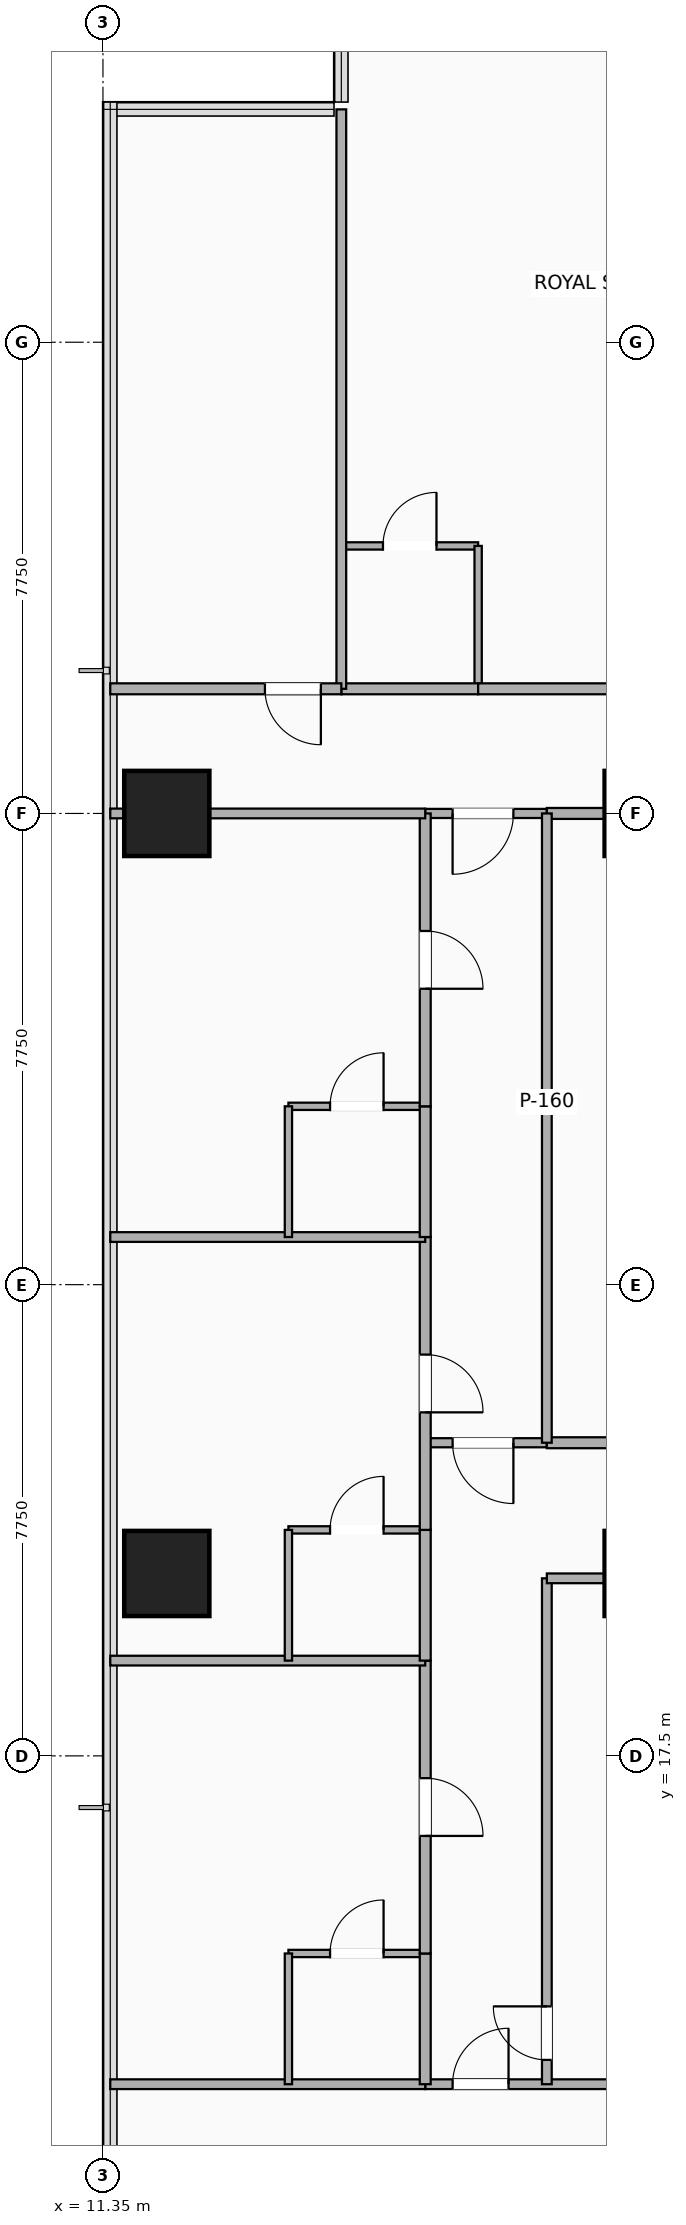
"""IFC4 building model, lengths in metres.
Left out: names, types, materials, properties, quantities, classifications, styles, units other than length and angle.
Written with IfcOpenShell. Run it as: python <this file> out.ifc"""

import sys

from ifc_helpers import new_model, si_unit, direction, frame, frame_2d, origin, origin_2d, place, context, subcontext, project, spatial, rectangle, extrude, element, fill, save


model = new_model("IFC4")
c1 = context("Model", 3, precision=1e-05, world=origin(), true_north=direction((0.0, 1.0)))
c2 = subcontext(c1, "Body", "Model", "MODEL_VIEW")
j1 = project(units=[si_unit("LENGTHUNIT", "METRE"), si_unit("PLANEANGLEUNIT", "RADIAN")], contexts=[c1])
p1 = place(None, origin())
s1 = spatial("IfcSite", under=j1, at=p1, CompositionType="ELEMENT")
p2 = place(p1, origin())
s2 = spatial("IfcBuilding", under=s1, at=p2, CompositionType="ELEMENT")
p3 = place(p2, frame((0.0, 0.0, 64.9)))
s3 = spatial("IfcBuildingStorey", under=s2, at=p3, CompositionType="ELEMENT", Elevation=64.9)
for number, where, z_axis, x_axis in (
    (1, (20.3, 20.5, -0.28), (0.0, 0.0, 1.0), (1.0, 0.0, 0.0)),
    (2, (20.3, 33.0, -0.28), (0.0, 0.0, 1.0), (1.0, 0.0, 0.0)),
    (3, (12.4, 20.5, -0.28), (0.0, 0.0, 1.0), (1.0, 0.0, 0.0)),
    (4, (12.4, 33.0, -0.28), (0.0, 0.0, 1.0), (1.0, 0.0, 0.0)),
):
    element("IfcColumn", number, at=place(p3, frame(where, z_axis=z_axis, x_axis=x_axis)), inside=s3, PredefinedType="COLUMN", context=c2, shape_type="SweptSolid", body=[
        extrude(rectangle(XDim=1.4, YDim=1.4, at=origin_2d()), origin(), (0.0, 0.0, 1.0), 3.5),
    ])
p4 = place(p3, frame((16.65, 12.1, 0.0), z_axis=(0.0, 0.0, 1.0), x_axis=(1.0, 0.0, 0.0)))
e5 = element("IfcWall", 5, at=p4, inside=s3, PredefinedType="PARTITIONING", context=c2, shape_type="SweptSolid", body=[
    extrude(rectangle(XDim=3.65, YDim=0.16, at=frame_2d((1.825, 0.0))), origin(), (0.0, 0.0, 1.0), 2.51),
])
p5 = place(p4, frame((1.37, 0.0, 0.0), z_axis=(0.0, 0.0, 1.0), x_axis=(-1.0, 0.0, 0.0)))
e6 = element("IfcOpeningElement", 6, at=p5, cuts=e5, PredefinedType="OPENING", context=c2, shape_type="SweptSolid", body=[
    extrude(rectangle(XDim=0.92, YDim=2.08, at=frame_2d((0.46, 1.04))), frame((0.0, 0.09, 0.0), z_axis=(0.0, -1.0, 0.0), x_axis=(1.0, 0.0, 0.0)), (0.0, 0.0, 1.0), 0.18),
])
p6 = place(p3, frame((18.65, 12.1, 0.0), z_axis=(0.0, 0.0, 1.0), x_axis=(0.0, 1.0, 0.0)))
e7 = element("IfcWall", 7, at=p6, inside=s3, PredefinedType="PARTITIONING", context=c2, shape_type="SweptSolid", body=[
    extrude(rectangle(XDim=8.32, YDim=0.16, at=frame_2d((4.16, 0.0))), origin(), (0.0, 0.0, 1.0), 2.51),
])
p7 = place(p6, frame((1.28, 0.0, 0.0), z_axis=(0.0, 0.0, 1.0), x_axis=(-1.0, 0.0, 0.0)))
e8 = element("IfcOpeningElement", 8, at=p7, cuts=e7, PredefinedType="OPENING", context=c2, shape_type="SweptSolid", body=[
    extrude(rectangle(XDim=0.88, YDim=2.08, at=frame_2d((0.44, 1.04))), frame((0.0, 0.09, 0.0), z_axis=(0.0, -1.0, 0.0), x_axis=(1.0, 0.0, 0.0)), (0.0, 0.0, 1.0), 0.18),
])
p8 = place(p3, frame((18.65, 20.42, 0.0), z_axis=(0.0, 0.0, 1.0), x_axis=(1.0, 0.0, 0.0)))
e9 = element("IfcWall", 9, at=p8, inside=s3, PredefinedType="PARTITIONING", context=c2, shape_type="SweptSolid", body=[
    extrude(rectangle(XDim=1.65, YDim=0.16, at=frame_2d((0.825, 0.0))), origin(), (0.0, 0.0, 1.0), 2.51),
])
p9 = place(p3, frame((16.65, 22.65, 0.0), z_axis=(0.0, 0.0, 1.0), x_axis=(1.0, 0.0, 0.0)))
e10 = element("IfcWall", 10, at=p9, inside=s3, PredefinedType="PARTITIONING", context=c2, shape_type="SweptSolid", body=[
    extrude(rectangle(XDim=2.0, YDim=0.15, at=frame_2d((1.0, 0.0))), origin(), (0.0, 0.0, 1.0), 3.22),
])
p10 = place(p9, frame((0.45, 0.0, 0.0)))
e11 = element("IfcOpeningElement", 11, at=p10, cuts=e10, PredefinedType="OPENING", context=c2, shape_type="SweptSolid", body=[
    extrude(rectangle(XDim=1.0, YDim=2.15, at=frame_2d((0.5, 1.075))), frame((0.0, 0.085, 0.0), z_axis=(0.0, -1.0, 0.0), x_axis=(1.0, 0.0, 0.0)), (0.0, 0.0, 1.0), 0.17),
])
p11 = place(p3, frame((16.65, 33.0, 0.0), z_axis=(0.0, 0.0, 1.0), x_axis=(1.0, 0.0, 0.0)))
e12 = element("IfcWall", 12, at=p11, inside=s3, PredefinedType="PARTITIONING", context=c2, shape_type="SweptSolid", body=[
    extrude(rectangle(XDim=2.0, YDim=0.15, at=frame_2d((1.0, 0.0))), origin(), (0.0, 0.0, 1.0), 2.51),
])
p12 = place(p11, frame((0.45, 0.0, 0.0)))
e13 = element("IfcOpeningElement", 13, at=p12, cuts=e12, PredefinedType="OPENING", context=c2, shape_type="SweptSolid", body=[
    extrude(rectangle(XDim=1.0, YDim=2.15, at=frame_2d((0.5, 1.075))), frame((0.0, 0.085, 0.0), z_axis=(0.0, -1.0, 0.0), x_axis=(1.0, 0.0, 0.0)), (0.0, 0.0, 1.0), 0.17),
])
p13 = place(p3, frame((18.65, 22.65, 0.0), z_axis=(0.0, 0.0, 1.0), x_axis=(1.0, 0.0, 0.0)))
e14 = element("IfcWall", 14, at=p13, inside=s3, PredefinedType="PARTITIONING", context=c2, shape_type="SweptSolid", body=[
    extrude(rectangle(XDim=5.45, YDim=0.18, at=frame_2d((2.725, 0.0))), origin(), (0.0, 0.0, 1.0), 2.51),
])
p14 = place(p13, frame((2.25, 0.0, 0.0)))
e15 = element("IfcOpeningElement", 15, at=p14, cuts=e14, PredefinedType="OPENING", context=c2, shape_type="SweptSolid", body=[
    extrude(rectangle(XDim=0.95, YDim=2.15, at=frame_2d((0.475, 1.075))), frame((0.0, 0.1, 0.0), z_axis=(0.0, -1.0, 0.0), x_axis=(1.0, 0.0, 0.0)), (0.0, 0.0, 1.0), 0.2),
])
p15 = place(p3, frame((18.65, 33.0, 0.0), z_axis=(0.0, 0.0, 1.0), x_axis=(1.0, 0.0, 0.0)))
e16 = element("IfcWall", 16, at=p15, inside=s3, PredefinedType="PARTITIONING", context=c2, shape_type="SweptSolid", body=[
    extrude(rectangle(XDim=5.45, YDim=0.18, at=frame_2d((2.725, 0.0))), origin(), (0.0, 0.0, 1.0), 2.51),
])
p16 = place(p3, frame((18.65, 22.65, 0.0), z_axis=(0.0, 0.0, 1.0), x_axis=(0.0, 1.0, 0.0)))
e17 = element("IfcWall", 17, at=p16, inside=s3, PredefinedType="PARTITIONING", context=c2, shape_type="SweptSolid", body=[
    extrude(rectangle(XDim=10.35, YDim=0.16, at=frame_2d((5.175, 0.0))), origin(), (0.0, 0.0, 1.0), 2.51),
])
p17 = place(p3, frame((15.27, 37.4, 0.0), z_axis=(0.0, 0.0, 1.0), x_axis=(1.0, 0.0, 0.0)))
e18 = element("IfcWall", 18, at=p17, inside=s3, PredefinedType="PARTITIONING", context=c2, shape_type="SweptSolid", body=[
    extrude(rectangle(XDim=2.25, YDim=0.12, at=frame_2d((1.125, 0.0))), origin(), (0.0, 0.0, 1.0), 3.22),
])
p18 = place(p17, frame((1.565, 0.0, 0.0), z_axis=(0.0, 0.0, 1.0), x_axis=(-1.0, 0.0, 0.0)))
e19 = element("IfcOpeningElement", 19, at=p18, cuts=e18, PredefinedType="OPENING", context=c2, shape_type="SweptSolid", body=[
    extrude(rectangle(XDim=0.88, YDim=2.08, at=frame_2d((0.44, 1.04))), frame((0.0, 0.07, 0.0), z_axis=(0.0, -1.0, 0.0), x_axis=(1.0, 0.0, 0.0)), (0.0, 0.0, 1.0), 0.14),
])
p19 = place(p3, frame((17.52, 35.05, 0.0), z_axis=(0.0, 0.0, 1.0), x_axis=(0.0, 1.0, 0.0)))
e20 = element("IfcWall", 20, at=p19, inside=s3, PredefinedType="PARTITIONING", context=c2, shape_type="SweptSolid", body=[
    extrude(rectangle(XDim=2.35, YDim=0.12, at=frame_2d((1.175, 0.0))), origin(), (0.0, 0.0, 1.0), 3.22),
])
p20 = place(p3, frame((15.27, 35.05, 0.0), z_axis=(0.0, 0.0, 1.0), x_axis=(1.0, 0.0, 0.0)))
e21 = element("IfcWall", 21, at=p20, inside=s3, PredefinedType="PARTITIONING", context=c2, shape_type="SweptSolid", body=[
    extrude(rectangle(XDim=2.25, YDim=0.18, at=frame_2d((1.125, 0.0))), origin(), (0.0, 0.0, 1.0), 3.22),
])
p21 = place(p3, frame((17.52, 35.05, 0.0), z_axis=(0.0, 0.0, 1.0), x_axis=(1.0, 0.0, 0.0)))
e22 = element("IfcWall", 22, at=p21, inside=s3, PredefinedType="PARTITIONING", context=c2, shape_type="SweptSolid", body=[
    extrude(rectangle(XDim=6.131, YDim=0.18, at=frame_2d((3.065, 0.0))), origin(), (0.0, 0.0, 1.0), 2.51),
])
p22 = place(p21, frame((2.591, 0.0, 0.0)))
e23 = element("IfcOpeningElement", 23, at=p22, cuts=e22, PredefinedType="OPENING", context=c2, shape_type="SweptSolid", body=[
    extrude(rectangle(XDim=0.95, YDim=2.15, at=frame_2d((0.475, 1.075))), frame((0.0, 0.1, 0.0), z_axis=(0.0, -1.0, 0.0), x_axis=(1.0, 0.0, 0.0)), (0.0, 0.0, 1.0), 0.2),
])
p23 = place(p3, frame((15.27, 35.05, 0.0), z_axis=(0.0, 0.0, 1.0), x_axis=(0.0, 1.0, 0.0)))
e24 = element("IfcWall", 24, at=p23, inside=s3, PredefinedType="PARTITIONING", context=c2, shape_type="SweptSolid", body=[
    extrude(rectangle(XDim=9.53, YDim=0.16, at=frame_2d((4.765, 0.0))), origin(), (0.0, 0.0, 1.0), 3.22),
])
p24 = place(p3, frame((11.47, 12.1, 0.0), z_axis=(0.0, 0.0, 1.0), x_axis=(1.0, 0.0, 0.0)))
e25 = element("IfcWall", 25, at=p24, inside=s3, PredefinedType="PARTITIONING", context=c2, shape_type="SweptSolid", body=[
    extrude(rectangle(XDim=5.18, YDim=0.16, at=frame_2d((2.59, 0.0))), origin(), (0.0, 0.0, 1.0), 2.583),
])
p25 = place(p3, frame((14.4, 14.25, 0.0), z_axis=(0.0, 0.0, 1.0), x_axis=(1.0, 0.0, 0.0)))
e26 = element("IfcWall", 26, at=p25, inside=s3, PredefinedType="PARTITIONING", context=c2, shape_type="SweptSolid", body=[
    extrude(rectangle(XDim=2.25, YDim=0.12, at=frame_2d((1.125, 0.0))), origin(), (0.0, 0.0, 1.0), 3.22),
])
p26 = place(p25, frame((1.565, 0.0, 0.0), z_axis=(0.0, 0.0, 1.0), x_axis=(-1.0, 0.0, 0.0)))
e27 = element("IfcOpeningElement", 27, at=p26, cuts=e26, PredefinedType="OPENING", context=c2, shape_type="SweptSolid", body=[
    extrude(rectangle(XDim=0.88, YDim=2.08, at=frame_2d((0.44, 1.04))), frame((0.0, 0.07, 0.0), z_axis=(0.0, -1.0, 0.0), x_axis=(1.0, 0.0, 0.0)), (0.0, 0.0, 1.0), 0.14),
])
p27 = place(p3, frame((14.4, 12.1, 0.0), z_axis=(0.0, 0.0, 1.0), x_axis=(0.0, 1.0, 0.0)))
e28 = element("IfcWall", 28, at=p27, inside=s3, PredefinedType="PARTITIONING", context=c2, shape_type="SweptSolid", body=[
    extrude(rectangle(XDim=2.15, YDim=0.12, at=frame_2d((1.075, 0.0))), origin(), (0.0, 0.0, 1.0), 2.902),
])
p28 = place(p3, frame((16.65, 12.1, 0.0), z_axis=(0.0, 0.0, 1.0), x_axis=(0.0, 1.0, 0.0)))
e29 = element("IfcWall", 29, at=p28, inside=s3, PredefinedType="PARTITIONING", context=c2, shape_type="SweptSolid", body=[
    extrude(rectangle(XDim=2.15, YDim=0.18, at=frame_2d((1.075, 0.0))), origin(), (0.0, 0.0, 1.0), 2.902),
])
p29 = place(p3, frame((16.65, 14.25, 0.0), z_axis=(0.0, 0.0, 1.0), x_axis=(0.0, 1.0, 0.0)))
e30 = element("IfcWall", 30, at=p29, inside=s3, PredefinedType="PARTITIONING", context=c2, shape_type="SweptSolid", body=[
    extrude(rectangle(XDim=4.817, YDim=0.18, at=frame_2d((2.408, 0.0))), origin(), (0.0, 0.0, 1.0), 2.902),
])
p30 = place(p29, frame((1.933, 0.0, 0.0)))
e31 = element("IfcOpeningElement", 31, at=p30, cuts=e30, PredefinedType="OPENING", context=c2, shape_type="SweptSolid", body=[
    extrude(rectangle(XDim=0.95, YDim=2.15, at=frame_2d((0.475, 1.075))), frame((0.0, 0.1, 0.0), z_axis=(0.0, -1.0, 0.0), x_axis=(1.0, 0.0, 0.0)), (0.0, 0.0, 1.0), 0.2),
])
p31 = place(p3, frame((11.47, 19.067, 0.0), z_axis=(0.0, 0.0, 1.0), x_axis=(1.0, 0.0, 0.0)))
e32 = element("IfcWall", 32, at=p31, inside=s3, PredefinedType="PARTITIONING", context=c2, shape_type="SweptSolid", body=[
    extrude(rectangle(XDim=5.18, YDim=0.16, at=frame_2d((2.59, 0.0))), origin(), (0.0, 0.0, 1.0), 2.583),
])
p32 = place(p3, frame((14.4, 21.217, 0.0), z_axis=(0.0, 0.0, 1.0), x_axis=(1.0, 0.0, 0.0)))
e33 = element("IfcWall", 33, at=p32, inside=s3, PredefinedType="PARTITIONING", context=c2, shape_type="SweptSolid", body=[
    extrude(rectangle(XDim=2.25, YDim=0.12, at=frame_2d((1.125, 0.0))), origin(), (0.0, 0.0, 1.0), 3.22),
])
p33 = place(p32, frame((1.565, 0.0, 0.0), z_axis=(0.0, 0.0, 1.0), x_axis=(-1.0, 0.0, 0.0)))
e34 = element("IfcOpeningElement", 34, at=p33, cuts=e33, PredefinedType="OPENING", context=c2, shape_type="SweptSolid", body=[
    extrude(rectangle(XDim=0.88, YDim=2.08, at=frame_2d((0.44, 1.04))), frame((0.0, 0.07, 0.0), z_axis=(0.0, -1.0, 0.0), x_axis=(1.0, 0.0, 0.0)), (0.0, 0.0, 1.0), 0.14),
])
p34 = place(p3, frame((14.4, 19.067, 0.0), z_axis=(0.0, 0.0, 1.0), x_axis=(0.0, 1.0, 0.0)))
e35 = element("IfcWall", 35, at=p34, inside=s3, PredefinedType="PARTITIONING", context=c2, shape_type="SweptSolid", body=[
    extrude(rectangle(XDim=2.15, YDim=0.12, at=frame_2d((1.075, 0.0))), origin(), (0.0, 0.0, 1.0), 2.51),
])
p35 = place(p3, frame((16.65, 19.067, 0.0), z_axis=(0.0, 0.0, 1.0), x_axis=(0.0, 1.0, 0.0)))
e36 = element("IfcWall", 36, at=p35, inside=s3, PredefinedType="PARTITIONING", context=c2, shape_type="SweptSolid", body=[
    extrude(rectangle(XDim=2.15, YDim=0.18, at=frame_2d((1.075, 0.0))), origin(), (0.0, 0.0, 1.0), 2.51),
])
p36 = place(p3, frame((16.65, 21.217, 0.0), z_axis=(0.0, 0.0, 1.0), x_axis=(0.0, 1.0, 0.0)))
e37 = element("IfcWall", 37, at=p36, inside=s3, PredefinedType="PARTITIONING", context=c2, shape_type="SweptSolid", body=[
    extrude(rectangle(XDim=4.816, YDim=0.18, at=frame_2d((2.408, 0.0))), origin(), (0.0, 0.0, 1.0), 2.788),
])
p37 = place(p36, frame((1.933, 0.0, 0.0)))
e38 = element("IfcOpeningElement", 38, at=p37, cuts=e37, PredefinedType="OPENING", context=c2, shape_type="SweptSolid", body=[
    extrude(rectangle(XDim=0.95, YDim=2.15, at=frame_2d((0.475, 1.075))), frame((0.0, 0.1, 0.0), z_axis=(0.0, -1.0, 0.0), x_axis=(1.0, 0.0, 0.0)), (0.0, 0.0, 1.0), 0.2),
])
p38 = place(p3, frame((11.47, 26.033, 0.0), z_axis=(0.0, 0.0, 1.0), x_axis=(1.0, 0.0, 0.0)))
e39 = element("IfcWall", 39, at=p38, inside=s3, PredefinedType="PARTITIONING", context=c2, shape_type="SweptSolid", body=[
    extrude(rectangle(XDim=5.18, YDim=0.16, at=frame_2d((2.59, 0.0))), origin(), (0.0, 0.0, 1.0), 2.583),
])
p39 = place(p3, frame((14.4, 28.183, 0.0), z_axis=(0.0, 0.0, 1.0), x_axis=(1.0, 0.0, 0.0)))
e40 = element("IfcWall", 40, at=p39, inside=s3, PredefinedType="PARTITIONING", context=c2, shape_type="SweptSolid", body=[
    extrude(rectangle(XDim=2.25, YDim=0.12, at=frame_2d((1.125, 0.0))), origin(), (0.0, 0.0, 1.0), 3.22),
])
p40 = place(p39, frame((1.565, 0.0, 0.0), z_axis=(0.0, 0.0, 1.0), x_axis=(-1.0, 0.0, 0.0)))
e41 = element("IfcOpeningElement", 41, at=p40, cuts=e40, PredefinedType="OPENING", context=c2, shape_type="SweptSolid", body=[
    extrude(rectangle(XDim=0.88, YDim=2.08, at=frame_2d((0.44, 1.04))), frame((0.0, 0.07, 0.0), z_axis=(0.0, -1.0, 0.0), x_axis=(1.0, 0.0, 0.0)), (0.0, 0.0, 1.0), 0.14),
])
p41 = place(p3, frame((14.4, 26.033, 0.0), z_axis=(0.0, 0.0, 1.0), x_axis=(0.0, 1.0, 0.0)))
e42 = element("IfcWall", 42, at=p41, inside=s3, PredefinedType="PARTITIONING", context=c2, shape_type="SweptSolid", body=[
    extrude(rectangle(XDim=2.15, YDim=0.12, at=frame_2d((1.075, 0.0))), origin(), (0.0, 0.0, 1.0), 3.22),
])
p42 = place(p3, frame((16.65, 26.033, 0.0), z_axis=(0.0, 0.0, 1.0), x_axis=(0.0, 1.0, 0.0)))
e43 = element("IfcWall", 43, at=p42, inside=s3, PredefinedType="PARTITIONING", context=c2, shape_type="SweptSolid", body=[
    extrude(rectangle(XDim=2.15, YDim=0.18, at=frame_2d((1.075, 0.0))), origin(), (0.0, 0.0, 1.0), 3.22),
])
p43 = place(p3, frame((16.65, 28.183, 0.0), z_axis=(0.0, 0.0, 1.0), x_axis=(0.0, 1.0, 0.0)))
e44 = element("IfcWall", 44, at=p43, inside=s3, PredefinedType="PARTITIONING", context=c2, shape_type="SweptSolid", body=[
    extrude(rectangle(XDim=4.817, YDim=0.18, at=frame_2d((2.408, 0.0))), origin(), (0.0, 0.0, 1.0), 2.51),
])
p44 = place(p43, frame((1.933, 0.0, 0.0)))
e45 = element("IfcOpeningElement", 45, at=p44, cuts=e44, PredefinedType="OPENING", context=c2, shape_type="SweptSolid", body=[
    extrude(rectangle(XDim=0.95, YDim=2.15, at=frame_2d((0.475, 1.075))), frame((0.0, 0.1, 0.0), z_axis=(0.0, -1.0, 0.0), x_axis=(1.0, 0.0, 0.0)), (0.0, 0.0, 1.0), 0.2),
])
p45 = place(p3, frame((11.47, 33.0, 0.0), z_axis=(0.0, 0.0, 1.0), x_axis=(1.0, 0.0, 0.0)))
e46 = element("IfcWall", 46, at=p45, inside=s3, PredefinedType="PARTITIONING", context=c2, shape_type="SweptSolid", body=[
    extrude(rectangle(XDim=5.18, YDim=0.16, at=frame_2d((2.59, 0.0))), origin(), (0.0, 0.0, 1.0), 2.51),
])
p46 = place(p3, frame((11.47, 35.05, 0.0), z_axis=(0.0, 0.0, 1.0), x_axis=(1.0, 0.0, 0.0)))
e47 = element("IfcWall", 47, at=p46, inside=s3, PredefinedType="PARTITIONING", context=c2, shape_type="SweptSolid", body=[
    extrude(rectangle(XDim=3.8, YDim=0.18, at=frame_2d((1.9, 0.0))), origin(), (0.0, 0.0, 1.0), 3.22),
])
p47 = place(p46, frame((2.544, 0.0, 0.0)))
e48 = element("IfcOpeningElement", 48, at=p47, cuts=e47, PredefinedType="OPENING", context=c2, shape_type="SweptSolid", body=[
    extrude(rectangle(XDim=0.92, YDim=2.08, at=frame_2d((0.46, 1.04))), frame((0.0, 0.1, 0.0), z_axis=(0.0, -1.0, 0.0), x_axis=(1.0, 0.0, 0.0)), (0.0, 0.0, 1.0), 0.2),
])
p48 = place(p5, origin())
e49 = element("IfcDoor", 49, at=p48, inside=s3, OperationType="SINGLE_SWING_RIGHT", PredefinedType="DOOR", context=c2, shape_type="SweptSolid", body=[
    extrude(rectangle(XDim=0.92, YDim=2.08, at=frame_2d((0.46, 1.04))), frame((0.0, 0.025, 0.0), z_axis=(0.0, -1.0, 0.0), x_axis=(1.0, 0.0, 0.0)), (0.0, 0.0, 1.0), 0.05),
])
fill(e6, e49)
p49 = place(p7, origin())
e50 = element("IfcDoor", 50, at=p49, inside=s3, OperationType="SINGLE_SWING_RIGHT", PredefinedType="DOOR", context=c2, shape_type="SweptSolid", body=[
    extrude(rectangle(XDim=0.88, YDim=2.08, at=frame_2d((0.44, 1.04))), frame((0.0, 0.025, 0.0), z_axis=(0.0, -1.0, 0.0), x_axis=(1.0, 0.0, 0.0)), (0.0, 0.0, 1.0), 0.05),
])
fill(e8, e50)
p50 = place(p10, origin())
e51 = element("IfcDoor", 51, at=p50, inside=s3, OperationType="SINGLE_SWING_RIGHT", PredefinedType="DOOR", context=c2, shape_type="SweptSolid", body=[
    extrude(rectangle(XDim=1.0, YDim=2.15, at=frame_2d((0.5, 1.075))), frame((0.0, 0.025, 0.0), z_axis=(0.0, -1.0, 0.0), x_axis=(1.0, 0.0, 0.0)), (0.0, 0.0, 1.0), 0.05),
])
fill(e11, e51)
p51 = place(p12, origin())
e52 = element("IfcDoor", 52, at=p51, inside=s3, OperationType="SINGLE_SWING_LEFT", PredefinedType="DOOR", context=c2, shape_type="SweptSolid", body=[
    extrude(rectangle(XDim=1.0, YDim=2.15, at=frame_2d((0.5, 1.075))), frame((0.0, 0.025, 0.0), z_axis=(0.0, -1.0, 0.0), x_axis=(1.0, 0.0, 0.0)), (0.0, 0.0, 1.0), 0.05),
])
fill(e13, e52)
p52 = place(p18, origin())
e53 = element("IfcDoor", 53, at=p52, inside=s3, OperationType="SINGLE_SWING_RIGHT", PredefinedType="DOOR", context=c2, shape_type="SweptSolid", body=[
    extrude(rectangle(XDim=0.88, YDim=2.08, at=frame_2d((0.44, 1.04))), frame((0.0, 0.025, 0.0), z_axis=(0.0, -1.0, 0.0), x_axis=(1.0, 0.0, 0.0)), (0.0, 0.0, 1.0), 0.05),
])
fill(e19, e53)
p53 = place(p26, origin())
e54 = element("IfcDoor", 54, at=p53, inside=s3, OperationType="SINGLE_SWING_RIGHT", PredefinedType="DOOR", context=c2, shape_type="SweptSolid", body=[
    extrude(rectangle(XDim=0.88, YDim=2.08, at=frame_2d((0.44, 1.04))), frame((0.0, 0.025, 0.0), z_axis=(0.0, -1.0, 0.0), x_axis=(1.0, 0.0, 0.0)), (0.0, 0.0, 1.0), 0.05),
])
fill(e27, e54)
p54 = place(p30, origin())
e55 = element("IfcDoor", 55, at=p54, inside=s3, OperationType="SINGLE_SWING_LEFT", PredefinedType="DOOR", context=c2, shape_type="SweptSolid", body=[
    extrude(rectangle(XDim=0.95, YDim=2.15, at=frame_2d((0.475, 1.075))), frame((0.0, 0.025, 0.0), z_axis=(0.0, -1.0, 0.0), x_axis=(1.0, 0.0, 0.0)), (0.0, 0.0, 1.0), 0.05),
])
fill(e31, e55)
p55 = place(p33, origin())
e56 = element("IfcDoor", 56, at=p55, inside=s3, OperationType="SINGLE_SWING_RIGHT", PredefinedType="DOOR", context=c2, shape_type="SweptSolid", body=[
    extrude(rectangle(XDim=0.88, YDim=2.08, at=frame_2d((0.44, 1.04))), frame((0.0, 0.025, 0.0), z_axis=(0.0, -1.0, 0.0), x_axis=(1.0, 0.0, 0.0)), (0.0, 0.0, 1.0), 0.05),
])
fill(e34, e56)
p56 = place(p37, origin())
e57 = element("IfcDoor", 57, at=p56, inside=s3, OperationType="SINGLE_SWING_LEFT", PredefinedType="DOOR", context=c2, shape_type="SweptSolid", body=[
    extrude(rectangle(XDim=0.95, YDim=2.15, at=frame_2d((0.475, 1.075))), frame((0.0, 0.025, 0.0), z_axis=(0.0, -1.0, 0.0), x_axis=(1.0, 0.0, 0.0)), (0.0, 0.0, 1.0), 0.05),
])
fill(e38, e57)
p57 = place(p40, origin())
e58 = element("IfcDoor", 58, at=p57, inside=s3, OperationType="SINGLE_SWING_RIGHT", PredefinedType="DOOR", context=c2, shape_type="SweptSolid", body=[
    extrude(rectangle(XDim=0.88, YDim=2.08, at=frame_2d((0.44, 1.04))), frame((0.0, 0.025, 0.0), z_axis=(0.0, -1.0, 0.0), x_axis=(1.0, 0.0, 0.0)), (0.0, 0.0, 1.0), 0.05),
])
fill(e41, e58)
p58 = place(p44, origin())
e59 = element("IfcDoor", 59, at=p58, inside=s3, OperationType="SINGLE_SWING_LEFT", PredefinedType="DOOR", context=c2, shape_type="SweptSolid", body=[
    extrude(rectangle(XDim=0.95, YDim=2.15, at=frame_2d((0.475, 1.075))), frame((0.0, 0.025, 0.0), z_axis=(0.0, -1.0, 0.0), x_axis=(1.0, 0.0, 0.0)), (0.0, 0.0, 1.0), 0.05),
])
fill(e45, e59)
p59 = place(p47, origin())
e60 = element("IfcDoor", 60, at=p59, inside=s3, OperationType="SINGLE_SWING_RIGHT", PredefinedType="DOOR", context=c2, shape_type="SweptSolid", body=[
    extrude(rectangle(XDim=0.92, YDim=2.08, at=frame_2d((0.46, 1.04))), frame((0.0, 0.025, 0.0), z_axis=(0.0, -1.0, 0.0), x_axis=(1.0, 0.0, 0.0)), (0.0, 0.0, 1.0), 0.05),
])
fill(e48, e60)
save(model, sys.argv[1])
